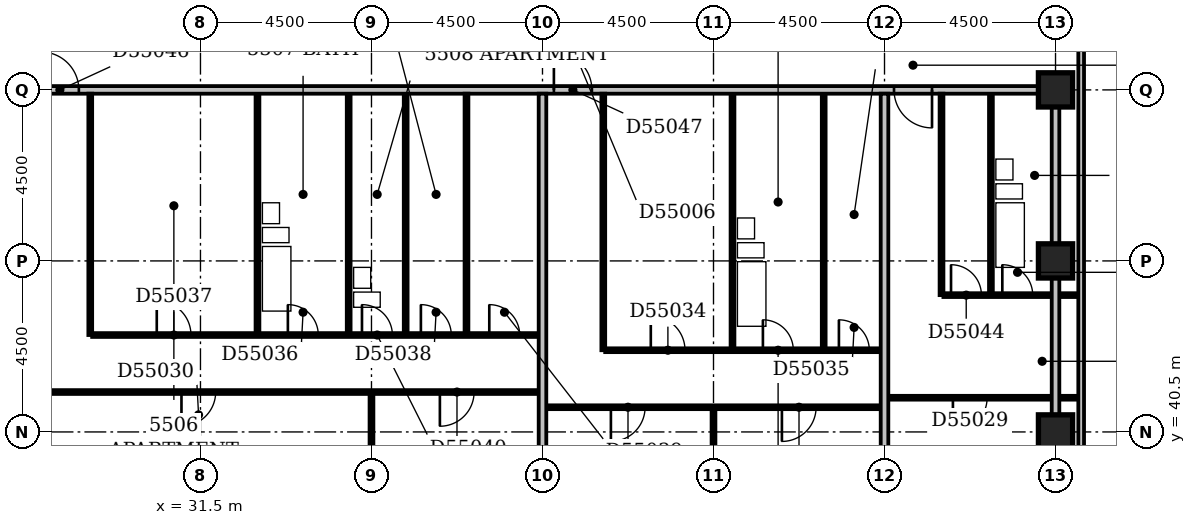
"""IFC4 building model, lengths in metres.
Left out: names, types, materials, properties, quantities, classifications, styles, units other than length and angle.
Written with IfcOpenShell. Run it as: python <this file> out.ifc"""

import sys

from ifc_helpers import new_model, si_unit, direction, frame, frame_2d, origin, origin_2d, place, context, subcontext, project, spatial, rectangle, extrude, element, fill, save


model = new_model("IFC4")
c1 = context("Model", 3, precision=1e-05, world=origin(), true_north=direction((0.0, 1.0)))
c2 = subcontext(c1, "Body", "Model", "MODEL_VIEW")
j1 = project(units=[si_unit("LENGTHUNIT", "METRE"), si_unit("PLANEANGLEUNIT", "RADIAN")], contexts=[c1])
p1 = place(None, origin())
s1 = spatial("IfcSite", under=j1, at=p1, CompositionType="ELEMENT")
p2 = place(p1, origin())
s2 = spatial("IfcBuilding", under=s1, at=p2, CompositionType="ELEMENT")
p3 = place(p2, frame((0.0, 0.0, 215.0)))
s3 = spatial("IfcBuildingStorey", under=s2, at=p3, CompositionType="ELEMENT", Elevation=215.0)
for number, where, z_axis, x_axis in (
    (1, (54.0, 40.5, -0.3), (0.0, 0.0, 1.0), (1.0, 0.0, 0.0)),
    (2, (54.0, 45.0, -0.3), (0.0, 0.0, 1.0), (1.0, 0.0, 0.0)),
    (3, (54.0, 49.5, -0.3), (0.0, 0.0, 1.0), (1.0, 0.0, 0.0)),
):
    element("IfcColumn", number, at=place(p3, frame(where, z_axis=z_axis, x_axis=x_axis)), inside=s3, PredefinedType="COLUMN", context=c2, shape_type="SweptSolid", body=[
        extrude(rectangle(XDim=0.9, YDim=0.9, at=origin_2d()), origin(), (0.0, 0.0, 1.0), 3.6),
    ])
p4 = place(p3, frame((54.675, 39.9, 0.0), z_axis=(0.0, 0.0, 1.0), x_axis=(0.0, 1.0, 0.0)))
e4 = element("IfcWall", 4, at=p4, inside=s3, PredefinedType="STANDARD", context=c2, shape_type="SweptSolid", body=[
    extrude(rectangle(XDim=14.85, YDim=0.15, at=frame_2d((7.425, 0.0))), origin(), (0.0, 0.0, 1.0), 2.7),
])
p5 = place(p3, frame((36.0, 36.45, 0.0), z_axis=(0.0, 0.0, 1.0), x_axis=(0.0, 1.0, 0.0)))
e5 = element("IfcWall", 5, at=p5, inside=s3, PredefinedType="PARTITIONING", context=c2, shape_type="SweptSolid", body=[
    extrude(rectangle(XDim=5.05, YDim=0.1, at=frame_2d((2.525, 0.0))), origin(), (0.0, 0.0, 1.0), 2.4),
])
p6 = place(p3, frame((40.5, 36.45, 0.0), z_axis=(0.0, 0.0, 1.0), x_axis=(0.0, 1.0, 0.0)))
e6 = element("IfcWall", 6, at=p6, inside=s3, PredefinedType="PARTITIONING", context=c2, shape_type="SweptSolid", body=[
    extrude(rectangle(XDim=12.95, YDim=0.2, at=frame_2d((6.475, 0.0))), origin(), (0.0, 0.0, 1.0), 3.3),
])
p7 = place(p3, frame((45.0, 36.45, 0.0), z_axis=(0.0, 0.0, 1.0), x_axis=(0.0, 1.0, 0.0)))
e7 = element("IfcWall", 7, at=p7, inside=s3, PredefinedType="PARTITIONING", context=c2, shape_type="SweptSolid", body=[
    extrude(rectangle(XDim=4.65, YDim=0.1, at=frame_2d((2.325, 0.0))), origin(), (0.0, 0.0, 1.0), 2.6),
])
p8 = place(p3, frame((49.5, 36.45, 0.0), z_axis=(0.0, 0.0, 1.0), x_axis=(0.0, 1.0, 0.0)))
e8 = element("IfcWall", 8, at=p8, inside=s3, PredefinedType="PARTITIONING", context=c2, shape_type="SweptSolid", body=[
    extrude(rectangle(XDim=12.95, YDim=0.2, at=frame_2d((6.475, 0.0))), origin(), (0.0, 0.0, 1.0), 3.3),
])
p9 = place(p3, frame((54.0, 40.95, 0.0), z_axis=(0.0, 0.0, 1.0), x_axis=(0.0, 1.0, 0.0)))
e9 = element("IfcWall", 9, at=p9, inside=s3, PredefinedType="PARTITIONING", context=c2, shape_type="SweptSolid", body=[
    extrude(rectangle(XDim=8.1, YDim=0.2, at=frame_2d((4.05, 0.0))), origin(), (0.0, 0.0, 1.0), 2.7),
])
p10 = place(p3, frame((40.6, 41.15, 0.0), z_axis=(0.0, 0.0, 1.0), x_axis=(1.0, 0.0, 0.0)))
e10 = element("IfcWall", 10, at=p10, inside=s3, PredefinedType="PARTITIONING", context=c2, shape_type="SweptSolid", body=[
    extrude(rectangle(XDim=8.8, YDim=0.1, at=frame_2d((4.4, 0.0))), origin(), (0.0, 0.0, 1.0), 3.3),
])
p11 = place(p10, frame((1.7, 0.0, 0.0)))
e11 = element("IfcOpeningElement", 11, at=p11, cuts=e10, PredefinedType="OPENING", context=c2, shape_type="SweptSolid", body=[
    extrude(rectangle(XDim=0.9, YDim=2.1, at=frame_2d((0.45, 1.05))), frame((0.0, 0.062, 0.0), z_axis=(0.0, -1.0, 0.0), x_axis=(1.0, 0.0, 0.0)), (0.0, 0.0, 1.0), 0.124),
])
p12 = place(p10, frame((6.2, 0.0, 0.0)))
e12 = element("IfcOpeningElement", 12, at=p12, cuts=e10, PredefinedType="OPENING", context=c2, shape_type="SweptSolid", body=[
    extrude(rectangle(XDim=0.9, YDim=2.1, at=frame_2d((0.45, 1.05))), frame((0.0, 0.062, 0.0), z_axis=(0.0, -1.0, 0.0), x_axis=(1.0, 0.0, 0.0)), (0.0, 0.0, 1.0), 0.124),
])
p13 = place(p3, frame((49.6, 41.4, 0.0), z_axis=(0.0, 0.0, 1.0), x_axis=(1.0, 0.0, 0.0)))
e13 = element("IfcWall", 13, at=p13, inside=s3, PredefinedType="PARTITIONING", context=c2, shape_type="SweptSolid", body=[
    extrude(rectangle(XDim=5.0, YDim=0.1, at=frame_2d((2.5, 0.0))), origin(), (0.0, 0.0, 1.0), 3.3),
])
p14 = place(p13, frame((1.7, 0.0, 0.0)))
e14 = element("IfcOpeningElement", 14, at=p14, cuts=e13, PredefinedType="OPENING", context=c2, shape_type="SweptSolid", body=[
    extrude(rectangle(XDim=0.9, YDim=2.1, at=frame_2d((0.45, 1.05))), frame((0.0, 0.062, 0.0), z_axis=(0.0, -1.0, 0.0), x_axis=(1.0, 0.0, 0.0)), (0.0, 0.0, 1.0), 0.124),
])
p15 = place(p3, frame((27.1, 41.55, 0.0), z_axis=(0.0, 0.0, 1.0), x_axis=(1.0, 0.0, 0.0)))
e15 = element("IfcWall", 15, at=p15, inside=s3, PredefinedType="PARTITIONING", context=c2, shape_type="SweptSolid", body=[
    extrude(rectangle(XDim=13.3, YDim=0.1, at=frame_2d((6.65, 0.0))), origin(), (0.0, 0.0, 1.0), 3.3),
])
p16 = place(p15, frame((3.9, 0.0, 0.0)))
e16 = element("IfcOpeningElement", 16, at=p16, cuts=e15, PredefinedType="OPENING", context=c2, shape_type="SweptSolid", body=[
    extrude(rectangle(XDim=0.9, YDim=2.1, at=frame_2d((0.45, 1.05))), frame((0.0, 0.062, 0.0), z_axis=(0.0, -1.0, 0.0), x_axis=(1.0, 0.0, 0.0)), (0.0, 0.0, 1.0), 0.124),
])
p17 = place(p15, frame((10.7, 0.0, 0.0)))
e17 = element("IfcOpeningElement", 17, at=p17, cuts=e15, PredefinedType="OPENING", context=c2, shape_type="SweptSolid", body=[
    extrude(rectangle(XDim=0.9, YDim=2.1, at=frame_2d((0.45, 1.05))), frame((0.0, 0.062, 0.0), z_axis=(0.0, -1.0, 0.0), x_axis=(1.0, 0.0, 0.0)), (0.0, 0.0, 1.0), 0.124),
])
p18 = place(p3, frame((42.1, 42.65, 0.0), z_axis=(0.0, 0.0, 1.0), x_axis=(0.0, 1.0, 0.0)))
e18 = element("IfcWall", 18, at=p18, inside=s3, PredefinedType="PARTITIONING", context=c2, shape_type="SweptSolid", body=[
    extrude(rectangle(XDim=6.75, YDim=0.1, at=frame_2d((3.375, 0.0))), origin(), (0.0, 0.0, 1.0), 3.3),
])
p19 = place(p3, frame((42.15, 42.65, 0.0), z_axis=(0.0, 0.0, 1.0), x_axis=(1.0, 0.0, 0.0)))
e19 = element("IfcWall", 19, at=p19, inside=s3, PredefinedType="PARTITIONING", context=c2, shape_type="SweptSolid", body=[
    extrude(rectangle(XDim=7.25, YDim=0.1, at=frame_2d((3.625, 0.0))), origin(), (0.0, 0.0, 1.0), 3.3),
])
p20 = place(p19, frame((4.15, 0.0, 0.0)))
e20 = element("IfcOpeningElement", 20, at=p20, cuts=e19, PredefinedType="OPENING", context=c2, shape_type="SweptSolid", body=[
    extrude(rectangle(XDim=0.8, YDim=2.1, at=frame_2d((0.4, 1.05))), frame((0.0, 0.062, 0.0), z_axis=(0.0, -1.0, 0.0), x_axis=(1.0, 0.0, 0.0)), (0.0, 0.0, 1.0), 0.124),
])
p21 = place(p19, frame((1.2, 0.0, 0.0)))
e21 = element("IfcOpeningElement", 21, at=p21, cuts=e19, PredefinedType="OPENING", context=c2, shape_type="SweptSolid", body=[
    extrude(rectangle(XDim=0.9, YDim=2.1, at=frame_2d((0.45, 1.05))), frame((0.0, 0.062, 0.0), z_axis=(0.0, -1.0, 0.0), x_axis=(1.0, 0.0, 0.0)), (0.0, 0.0, 1.0), 0.124),
])
p22 = place(p19, frame((6.15, 0.0, 0.0)))
e22 = element("IfcOpeningElement", 22, at=p22, cuts=e19, PredefinedType="OPENING", context=c2, shape_type="SweptSolid", body=[
    extrude(rectangle(XDim=0.8, YDim=2.1, at=frame_2d((0.4, 1.05))), frame((0.0, 0.062, 0.0), z_axis=(0.0, -1.0, 0.0), x_axis=(1.0, 0.0, 0.0)), (0.0, 0.0, 1.0), 0.124),
])
p23 = place(p3, frame((45.5, 42.7, 0.0), z_axis=(0.0, 0.0, 1.0), x_axis=(0.0, 1.0, 0.0)))
e23 = element("IfcWall", 23, at=p23, inside=s3, PredefinedType="PLUMBINGWALL", context=c2, shape_type="SweptSolid", body=[
    extrude(rectangle(XDim=6.7, YDim=0.1, at=frame_2d((3.35, 0.0))), origin(), (0.0, 0.0, 1.0), 2.6),
])
p24 = place(p3, frame((47.9, 42.7, 0.0), z_axis=(0.0, 0.0, 1.0), x_axis=(0.0, 1.0, 0.0)))
e24 = element("IfcWall", 24, at=p24, inside=s3, PredefinedType="PLUMBINGWALL", context=c2, shape_type="SweptSolid", body=[
    extrude(rectangle(XDim=6.7, YDim=0.1, at=frame_2d((3.35, 0.0))), origin(), (0.0, 0.0, 1.0), 3.3),
])
p25 = place(p3, frame((28.6, 43.05, 0.0), z_axis=(0.0, 0.0, 1.0), x_axis=(0.0, 1.0, 0.0)))
e25 = element("IfcWall", 25, at=p25, inside=s3, PredefinedType="PARTITIONING", context=c2, shape_type="SweptSolid", body=[
    extrude(rectangle(XDim=6.35, YDim=0.1, at=frame_2d((3.175, 0.0))), origin(), (0.0, 0.0, 1.0), 3.3),
])
p26 = place(p3, frame((28.65, 43.05, 0.0), z_axis=(0.0, 0.0, 1.0), x_axis=(1.0, 0.0, 0.0)))
e26 = element("IfcWall", 26, at=p26, inside=s3, PredefinedType="PARTITIONING", context=c2, shape_type="SweptSolid", body=[
    extrude(rectangle(XDim=11.75, YDim=0.1, at=frame_2d((5.875, 0.0))), origin(), (0.0, 0.0, 1.0), 3.3),
])
p27 = place(p26, frame((5.15, 0.0, 0.0)))
e27 = element("IfcOpeningElement", 27, at=p27, cuts=e26, PredefinedType="OPENING", context=c2, shape_type="SweptSolid", body=[
    extrude(rectangle(XDim=0.8, YDim=2.1, at=frame_2d((0.4, 1.05))), frame((0.0, 0.062, 0.0), z_axis=(0.0, -1.0, 0.0), x_axis=(1.0, 0.0, 0.0)), (0.0, 0.0, 1.0), 0.124),
])
p28 = place(p26, frame((1.7, 0.0, 0.0)))
e28 = element("IfcOpeningElement", 28, at=p28, cuts=e26, PredefinedType="OPENING", context=c2, shape_type="SweptSolid", body=[
    extrude(rectangle(XDim=0.9, YDim=2.1, at=frame_2d((0.45, 1.05))), frame((0.0, 0.062, 0.0), z_axis=(0.0, -1.0, 0.0), x_axis=(1.0, 0.0, 0.0)), (0.0, 0.0, 1.0), 0.124),
])
p29 = place(p26, frame((8.65, 0.0, 0.0)))
e29 = element("IfcOpeningElement", 29, at=p29, cuts=e26, PredefinedType="OPENING", context=c2, shape_type="SweptSolid", body=[
    extrude(rectangle(XDim=0.8, YDim=2.1, at=frame_2d((0.4, 1.05))), frame((0.0, 0.062, 0.0), z_axis=(0.0, -1.0, 0.0), x_axis=(1.0, 0.0, 0.0)), (0.0, 0.0, 1.0), 0.124),
])
p30 = place(p26, frame((10.45, 0.0, 0.0)))
e30 = element("IfcOpeningElement", 30, at=p30, cuts=e26, PredefinedType="OPENING", context=c2, shape_type="SweptSolid", body=[
    extrude(rectangle(XDim=0.8, YDim=2.1, at=frame_2d((0.4, 1.05))), frame((0.0, 0.062, 0.0), z_axis=(0.0, -1.0, 0.0), x_axis=(1.0, 0.0, 0.0)), (0.0, 0.0, 1.0), 0.124),
])
p31 = place(p26, frame((7.1, 0.0, 0.0)))
e31 = element("IfcOpeningElement", 31, at=p31, cuts=e26, PredefinedType="OPENING", context=c2, shape_type="SweptSolid", body=[
    extrude(rectangle(XDim=0.8, YDim=2.1, at=frame_2d((0.4, 1.05))), frame((0.0, 0.062, 0.0), z_axis=(0.0, -1.0, 0.0), x_axis=(1.0, 0.0, 0.0)), (0.0, 0.0, 1.0), 0.124),
])
p32 = place(p3, frame((33.0, 43.1, 0.0), z_axis=(0.0, 0.0, 1.0), x_axis=(0.0, 1.0, 0.0)))
e32 = element("IfcWall", 32, at=p32, inside=s3, PredefinedType="PLUMBINGWALL", context=c2, shape_type="SweptSolid", body=[
    extrude(rectangle(XDim=6.3, YDim=0.1, at=frame_2d((3.15, 0.0))), origin(), (0.0, 0.0, 1.0), 3.3),
])
p33 = place(p3, frame((35.4, 43.1, 0.0), z_axis=(0.0, 0.0, 1.0), x_axis=(0.0, 1.0, 0.0)))
e33 = element("IfcWall", 33, at=p33, inside=s3, PredefinedType="PLUMBINGWALL", context=c2, shape_type="SweptSolid", body=[
    extrude(rectangle(XDim=6.3, YDim=0.1, at=frame_2d((3.15, 0.0))), origin(), (0.0, 0.0, 1.0), 2.4),
])
p34 = place(p3, frame((36.9, 43.1, 0.0), z_axis=(0.0, 0.0, 1.0), x_axis=(0.0, 1.0, 0.0)))
e34 = element("IfcWall", 34, at=p34, inside=s3, PredefinedType="PLUMBINGWALL", context=c2, shape_type="SweptSolid", body=[
    extrude(rectangle(XDim=6.3, YDim=0.1, at=frame_2d((3.15, 0.0))), origin(), (0.0, 0.0, 1.0), 3.3),
])
p35 = place(p3, frame((38.5, 43.1, 0.0), z_axis=(0.0, 0.0, 1.0), x_axis=(0.0, 1.0, 0.0)))
e35 = element("IfcWall", 35, at=p35, inside=s3, PredefinedType="PARTITIONING", context=c2, shape_type="SweptSolid", body=[
    extrude(rectangle(XDim=6.3, YDim=0.1, at=frame_2d((3.15, 0.0))), origin(), (0.0, 0.0, 1.0), 3.3),
])
p36 = place(p3, frame((51.0, 44.1, 0.0), z_axis=(0.0, 0.0, 1.0), x_axis=(0.0, 1.0, 0.0)))
e36 = element("IfcWall", 36, at=p36, inside=s3, PredefinedType="PARTITIONING", context=c2, shape_type="SweptSolid", body=[
    extrude(rectangle(XDim=5.3, YDim=0.1, at=frame_2d((2.65, 0.0))), origin(), (0.0, 0.0, 1.0), 3.3),
])
p37 = place(p3, frame((51.05, 44.1, 0.0), z_axis=(0.0, 0.0, 1.0), x_axis=(1.0, 0.0, 0.0)))
e37 = element("IfcWall", 37, at=p37, inside=s3, PredefinedType="PARTITIONING", context=c2, shape_type="SweptSolid", body=[
    extrude(rectangle(XDim=3.55, YDim=0.1, at=frame_2d((1.775, 0.0))), origin(), (0.0, 0.0, 1.0), 3.3),
])
p38 = place(p37, frame((1.55, 0.0, 0.0)))
e38 = element("IfcOpeningElement", 38, at=p38, cuts=e37, PredefinedType="OPENING", context=c2, shape_type="SweptSolid", body=[
    extrude(rectangle(XDim=0.8, YDim=2.1, at=frame_2d((0.4, 1.05))), frame((0.0, 0.062, 0.0), z_axis=(0.0, -1.0, 0.0), x_axis=(1.0, 0.0, 0.0)), (0.0, 0.0, 1.0), 0.124),
])
p39 = place(p37, frame((0.2, 0.0, 0.0)))
e39 = element("IfcOpeningElement", 39, at=p39, cuts=e37, PredefinedType="OPENING", context=c2, shape_type="SweptSolid", body=[
    extrude(rectangle(XDim=0.8, YDim=2.1, at=frame_2d((0.4, 1.05))), frame((0.0, 0.062, 0.0), z_axis=(0.0, -1.0, 0.0), x_axis=(1.0, 0.0, 0.0)), (0.0, 0.0, 1.0), 0.124),
])
p40 = place(p3, frame((52.3, 44.15, 0.0), z_axis=(0.0, 0.0, 1.0), x_axis=(0.0, 1.0, 0.0)))
e40 = element("IfcWall", 40, at=p40, inside=s3, PredefinedType="PLUMBINGWALL", context=c2, shape_type="SweptSolid", body=[
    extrude(rectangle(XDim=5.25, YDim=0.1, at=frame_2d((2.625, 0.0))), origin(), (0.0, 0.0, 1.0), 3.3),
])
p41 = place(p3, frame((22.6, 49.5, 0.0), z_axis=(0.0, 0.0, 1.0), x_axis=(1.0, 0.0, 0.0)))
e41 = element("IfcWall", 41, at=p41, inside=s3, PredefinedType="PARTITIONING", context=c2, shape_type="SweptSolid", body=[
    extrude(rectangle(XDim=30.95, YDim=0.2, at=frame_2d((15.475, 0.0))), origin(), (0.0, 0.0, 1.0), 3.3),
])
p42 = place(p41, frame((1.85, 0.0, 0.0)))
e42 = element("IfcOpeningElement", 42, at=p42, cuts=e41, PredefinedType="OPENING", context=c2, shape_type="SweptSolid", body=[
    extrude(rectangle(XDim=1.0, YDim=2.1, at=frame_2d((0.5, 1.05))), frame((0.0, 0.112, 0.0), z_axis=(0.0, -1.0, 0.0), x_axis=(1.0, 0.0, 0.0)), (0.0, 0.0, 1.0), 0.224),
])
p43 = place(p41, frame((4.7, 0.0, 0.0)))
e43 = element("IfcOpeningElement", 43, at=p43, cuts=e41, PredefinedType="OPENING", context=c2, shape_type="SweptSolid", body=[
    extrude(rectangle(XDim=1.0, YDim=2.1, at=frame_2d((0.5, 1.05))), frame((0.0, 0.112, 0.0), z_axis=(0.0, -1.0, 0.0), x_axis=(1.0, 0.0, 0.0)), (0.0, 0.0, 1.0), 0.224),
])
p44 = place(p41, frame((18.2, 0.0, 0.0)))
e44 = element("IfcOpeningElement", 44, at=p44, cuts=e41, PredefinedType="OPENING", context=c2, shape_type="SweptSolid", body=[
    extrude(rectangle(XDim=1.0, YDim=2.1, at=frame_2d((0.5, 1.05))), frame((0.0, 0.112, 0.0), z_axis=(0.0, -1.0, 0.0), x_axis=(1.0, 0.0, 0.0)), (0.0, 0.0, 1.0), 0.224),
])
p45 = place(p41, frame((27.15, 0.0, 0.0)))
e45 = element("IfcOpeningElement", 45, at=p45, cuts=e41, PredefinedType="OPENING", context=c2, shape_type="SweptSolid", body=[
    extrude(rectangle(XDim=1.0, YDim=2.1, at=frame_2d((0.5, 1.05))), frame((0.0, 0.112, 0.0), z_axis=(0.0, -1.0, 0.0), x_axis=(1.0, 0.0, 0.0)), (0.0, 0.0, 1.0), 0.224),
])
p46 = place(p11, frame((0.9, 0.0, 0.0), z_axis=(0.0, 0.0, 1.0), x_axis=(-1.0, 0.0, 0.0)))
e46 = element("IfcDoor", 46, at=p46, inside=s3, OperationType="SINGLE_SWING_RIGHT", PredefinedType="DOOR", context=c2, shape_type="SweptSolid", body=[
    extrude(rectangle(XDim=0.9, YDim=2.1, at=frame_2d((0.45, 1.05))), frame((0.0, 0.025, 0.0), z_axis=(0.0, -1.0, 0.0), x_axis=(1.0, 0.0, 0.0)), (0.0, 0.0, 1.0), 0.05),
])
fill(e11, e46)
p47 = place(p12, frame((0.9, 0.0, 0.0), z_axis=(0.0, 0.0, 1.0), x_axis=(-1.0, 0.0, 0.0)))
e47 = element("IfcDoor", 47, at=p47, inside=s3, OperationType="SINGLE_SWING_RIGHT", PredefinedType="DOOR", context=c2, shape_type="SweptSolid", body=[
    extrude(rectangle(XDim=0.9, YDim=2.1, at=frame_2d((0.45, 1.05))), frame((0.0, 0.025, 0.0), z_axis=(0.0, -1.0, 0.0), x_axis=(1.0, 0.0, 0.0)), (0.0, 0.0, 1.0), 0.05),
])
fill(e12, e47)
p48 = place(p14, frame((0.9, 0.0, 0.0), z_axis=(0.0, 0.0, 1.0), x_axis=(-1.0, 0.0, 0.0)))
e48 = element("IfcDoor", 48, at=p48, inside=s3, OperationType="SINGLE_SWING_RIGHT", PredefinedType="DOOR", context=c2, shape_type="SweptSolid", body=[
    extrude(rectangle(XDim=0.9, YDim=2.1, at=frame_2d((0.45, 1.05))), frame((0.0, 0.025, 0.0), z_axis=(0.0, -1.0, 0.0), x_axis=(1.0, 0.0, 0.0)), (0.0, 0.0, 1.0), 0.05),
])
fill(e14, e48)
p49 = place(p16, frame((0.9, 0.0, 0.0), z_axis=(0.0, 0.0, 1.0), x_axis=(-1.0, 0.0, 0.0)))
e49 = element("IfcDoor", 49, at=p49, inside=s3, OperationType="SINGLE_SWING_RIGHT", PredefinedType="DOOR", context=c2, shape_type="SweptSolid", body=[
    extrude(rectangle(XDim=0.9, YDim=2.1, at=frame_2d((0.45, 1.05))), frame((0.0, 0.025, 0.0), z_axis=(0.0, -1.0, 0.0), x_axis=(1.0, 0.0, 0.0)), (0.0, 0.0, 1.0), 0.05),
])
fill(e16, e49)
p50 = place(p17, frame((0.9, 0.0, 0.0), z_axis=(0.0, 0.0, 1.0), x_axis=(-1.0, 0.0, 0.0)))
e50 = element("IfcDoor", 50, at=p50, inside=s3, OperationType="SINGLE_SWING_RIGHT", PredefinedType="DOOR", context=c2, shape_type="SweptSolid", body=[
    extrude(rectangle(XDim=0.9, YDim=2.1, at=frame_2d((0.45, 1.05))), frame((0.0, 0.025, 0.0), z_axis=(0.0, -1.0, 0.0), x_axis=(1.0, 0.0, 0.0)), (0.0, 0.0, 1.0), 0.05),
])
fill(e17, e50)
p51 = place(p20, origin())
e51 = element("IfcDoor", 51, at=p51, inside=s3, OperationType="SINGLE_SWING_LEFT", PredefinedType="DOOR", context=c2, shape_type="SweptSolid", body=[
    extrude(rectangle(XDim=0.8, YDim=2.1, at=frame_2d((0.4, 1.05))), frame((0.0, 0.025, 0.0), z_axis=(0.0, -1.0, 0.0), x_axis=(1.0, 0.0, 0.0)), (0.0, 0.0, 1.0), 0.05),
])
fill(e20, e51)
p52 = place(p21, origin())
e52 = element("IfcDoor", 52, at=p52, inside=s3, OperationType="SINGLE_SWING_LEFT", PredefinedType="DOOR", context=c2, shape_type="SweptSolid", body=[
    extrude(rectangle(XDim=0.9, YDim=2.1, at=frame_2d((0.45, 1.05))), frame((0.0, 0.025, 0.0), z_axis=(0.0, -1.0, 0.0), x_axis=(1.0, 0.0, 0.0)), (0.0, 0.0, 1.0), 0.05),
])
fill(e21, e52)
p53 = place(p22, origin())
e53 = element("IfcDoor", 53, at=p53, inside=s3, OperationType="SINGLE_SWING_LEFT", PredefinedType="DOOR", context=c2, shape_type="SweptSolid", body=[
    extrude(rectangle(XDim=0.8, YDim=2.1, at=frame_2d((0.4, 1.05))), frame((0.0, 0.025, 0.0), z_axis=(0.0, -1.0, 0.0), x_axis=(1.0, 0.0, 0.0)), (0.0, 0.0, 1.0), 0.05),
])
fill(e22, e53)
p54 = place(p27, origin())
e54 = element("IfcDoor", 54, at=p54, inside=s3, OperationType="SINGLE_SWING_LEFT", PredefinedType="DOOR", context=c2, shape_type="SweptSolid", body=[
    extrude(rectangle(XDim=0.8, YDim=2.1, at=frame_2d((0.4, 1.05))), frame((0.0, 0.025, 0.0), z_axis=(0.0, -1.0, 0.0), x_axis=(1.0, 0.0, 0.0)), (0.0, 0.0, 1.0), 0.05),
])
fill(e27, e54)
p55 = place(p28, origin())
e55 = element("IfcDoor", 55, at=p55, inside=s3, OperationType="SINGLE_SWING_LEFT", PredefinedType="DOOR", context=c2, shape_type="SweptSolid", body=[
    extrude(rectangle(XDim=0.9, YDim=2.1, at=frame_2d((0.45, 1.05))), frame((0.0, 0.025, 0.0), z_axis=(0.0, -1.0, 0.0), x_axis=(1.0, 0.0, 0.0)), (0.0, 0.0, 1.0), 0.05),
])
fill(e28, e55)
p56 = place(p29, origin())
e56 = element("IfcDoor", 56, at=p56, inside=s3, OperationType="SINGLE_SWING_LEFT", PredefinedType="DOOR", context=c2, shape_type="SweptSolid", body=[
    extrude(rectangle(XDim=0.8, YDim=2.1, at=frame_2d((0.4, 1.05))), frame((0.0, 0.025, 0.0), z_axis=(0.0, -1.0, 0.0), x_axis=(1.0, 0.0, 0.0)), (0.0, 0.0, 1.0), 0.05),
])
fill(e29, e56)
p57 = place(p30, origin())
e57 = element("IfcDoor", 57, at=p57, inside=s3, OperationType="SINGLE_SWING_LEFT", PredefinedType="DOOR", context=c2, shape_type="SweptSolid", body=[
    extrude(rectangle(XDim=0.8, YDim=2.1, at=frame_2d((0.4, 1.05))), frame((0.0, 0.025, 0.0), z_axis=(0.0, -1.0, 0.0), x_axis=(1.0, 0.0, 0.0)), (0.0, 0.0, 1.0), 0.05),
])
fill(e30, e57)
p58 = place(p31, origin())
e58 = element("IfcDoor", 58, at=p58, inside=s3, OperationType="SINGLE_SWING_LEFT", PredefinedType="DOOR", context=c2, shape_type="SweptSolid", body=[
    extrude(rectangle(XDim=0.8, YDim=2.1, at=frame_2d((0.4, 1.05))), frame((0.0, 0.025, 0.0), z_axis=(0.0, -1.0, 0.0), x_axis=(1.0, 0.0, 0.0)), (0.0, 0.0, 1.0), 0.05),
])
fill(e31, e58)
p59 = place(p38, origin())
e59 = element("IfcDoor", 59, at=p59, inside=s3, OperationType="SINGLE_SWING_LEFT", PredefinedType="DOOR", context=c2, shape_type="SweptSolid", body=[
    extrude(rectangle(XDim=0.8, YDim=2.1, at=frame_2d((0.4, 1.05))), frame((0.0, 0.025, 0.0), z_axis=(0.0, -1.0, 0.0), x_axis=(1.0, 0.0, 0.0)), (0.0, 0.0, 1.0), 0.05),
])
fill(e38, e59)
p60 = place(p39, origin())
e60 = element("IfcDoor", 60, at=p60, inside=s3, OperationType="SINGLE_SWING_LEFT", PredefinedType="DOOR", context=c2, shape_type="SweptSolid", body=[
    extrude(rectangle(XDim=0.8, YDim=2.1, at=frame_2d((0.4, 1.05))), frame((0.0, 0.025, 0.0), z_axis=(0.0, -1.0, 0.0), x_axis=(1.0, 0.0, 0.0)), (0.0, 0.0, 1.0), 0.05),
])
fill(e39, e60)
p61 = place(p43, origin())
e61 = element("IfcDoor", 61, at=p61, inside=s3, OperationType="SINGLE_SWING_LEFT", PredefinedType="DOOR", context=c2, shape_type="SweptSolid", body=[
    extrude(rectangle(XDim=1.0, YDim=2.1, at=frame_2d((0.5, 1.05))), frame((0.0, 0.025, 0.0), z_axis=(0.0, -1.0, 0.0), x_axis=(1.0, 0.0, 0.0)), (0.0, 0.0, 1.0), 0.05),
])
fill(e43, e61)
p62 = place(p44, origin())
e62 = element("IfcDoor", 62, at=p62, inside=s3, OperationType="SINGLE_SWING_LEFT", PredefinedType="DOOR", context=c2, shape_type="SweptSolid", body=[
    extrude(rectangle(XDim=1.0, YDim=2.1, at=frame_2d((0.5, 1.05))), frame((0.0, 0.025, 0.0), z_axis=(0.0, -1.0, 0.0), x_axis=(1.0, 0.0, 0.0)), (0.0, 0.0, 1.0), 0.05),
])
fill(e44, e62)
p63 = place(p45, origin())
e63 = element("IfcDoor", 63, at=p63, inside=s3, OperationType="SINGLE_SWING_RIGHT", PredefinedType="DOOR", context=c2, shape_type="SweptSolid", body=[
    extrude(rectangle(XDim=1.0, YDim=2.1, at=frame_2d((0.5, 1.05))), frame((0.0, 0.025, 0.0), z_axis=(0.0, -1.0, 0.0), x_axis=(1.0, 0.0, 0.0)), (0.0, 0.0, 1.0), 0.05),
])
fill(e45, e63)
save(model, sys.argv[1])
